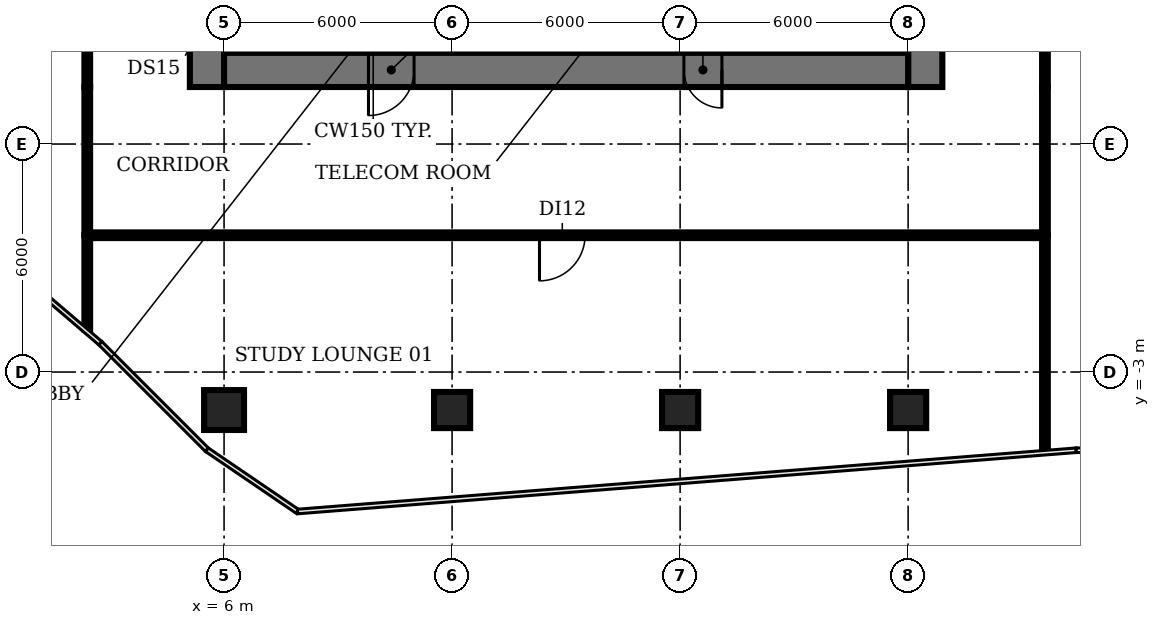
"""IFC4 building model, lengths in metres.
Left out: names, types, materials, properties, quantities, classifications, styles, units other than length and angle.
Written with IfcOpenShell. Run it as: python <this file> out.ifc"""

import sys

from ifc_helpers import new_model, si_unit, direction, frame, frame_2d, origin, origin_2d, place, context, subcontext, project, spatial, rectangle, circle, extrude, element, fill, save


model = new_model("IFC4")
c1 = context("Model", 3, precision=1e-05, world=origin(), true_north=direction((0.0, 1.0)))
c2 = subcontext(c1, "Body", "Model", "MODEL_VIEW")
j1 = project(units=[si_unit("LENGTHUNIT", "METRE"), si_unit("PLANEANGLEUNIT", "RADIAN")], contexts=[c1])
p1 = place(None, origin())
s1 = spatial("IfcSite", under=j1, at=p1, CompositionType="ELEMENT")
p2 = place(p1, origin())
s2 = spatial("IfcBuilding", under=s1, at=p2, CompositionType="ELEMENT")
p3 = place(p2, frame((0.0, 0.0, 71.0)))
s3 = spatial("IfcBuildingStorey", under=s2, at=p3, CompositionType="ELEMENT", Elevation=71.0)
p4 = place(p3, frame((6.0, -4.0, 0.0), z_axis=(0.0, 0.0, 1.0), x_axis=(1.0, 0.0, 0.0)))
e1 = element("IfcColumn", 1, at=p4, inside=s3, PredefinedType="COLUMN", context=c2, shape_type="SweptSolid", body=[
    extrude(circle(Radius=0.525, at=origin_2d()), origin(), (0.0, 0.0, 1.0), 3.85),
])
for number, where, z_axis, x_axis in (
    (2, (12.0, -4.0, 0.0), (0.0, 0.0, 1.0), (1.0, 0.0, 0.0)),
    (3, (18.0, -4.0, 0.0), (0.0, 0.0, 1.0), (1.0, 0.0, 0.0)),
    (4, (24.0, -4.0, 0.0), (0.0, 0.0, 1.0), (1.0, 0.0, 0.0)),
):
    element("IfcColumn", number, at=place(p3, frame(where, z_axis=z_axis, x_axis=x_axis)), inside=s3, PredefinedType="COLUMN", context=c2, shape_type="SweptSolid", body=[
        extrude(rectangle(XDim=0.95, YDim=0.95, at=origin_2d()), origin(), (0.0, 0.0, 1.0), 3.85),
    ])
p5 = place(p3, frame((9.275, 11.825, 0.0), z_axis=(0.0, 0.0, 1.0), x_axis=(0.0, -1.0, 0.0)))
e5 = element("IfcWall", 5, at=p5, inside=s3, PredefinedType="SHEAR", context=c2, shape_type="SweptSolid", body=[
    extrude(rectangle(XDim=6.425, YDim=0.25, at=frame_2d((3.212, 0.0))), origin(), (0.0, 0.0, 1.0), 3.85),
])
p6 = place(p5, frame((5.075, 0.0, 0.0)))
e6 = element("IfcOpeningElement", 6, at=p6, cuts=e5, PredefinedType="OPENING", context=c2, shape_type="SweptSolid", body=[
    extrude(rectangle(XDim=1.0, YDim=2.1, at=frame_2d((0.5, 1.05))), frame((0.0, 0.135, 0.0), z_axis=(0.0, -1.0, 0.0), x_axis=(1.0, 0.0, 0.0)), (0.0, 0.0, 1.0), 0.27),
])
p7 = place(p3, frame((13.5, 5.4, 0.0), z_axis=(0.0, 0.0, 1.0), x_axis=(0.0, 1.0, 0.0)))
e7 = element("IfcWall", 7, at=p7, inside=s3, PredefinedType="SHEAR", context=c2, shape_type="SweptSolid", body=[
    extrude(rectangle(XDim=8.2, YDim=0.2, at=frame_2d((4.1, 0.0))), origin(), (0.0, 0.0, 1.0), 3.85),
])
p8 = place(p7, frame((0.75, 0.0, 0.0)))
e8 = element("IfcOpeningElement", 8, at=p8, cuts=e7, PredefinedType="OPENING", context=c2, shape_type="SweptSolid", body=[
    extrude(rectangle(XDim=1.1, YDim=2.1, at=frame_2d((0.55, 1.05))), frame((0.0, 0.11, 0.0), z_axis=(0.0, -1.0, 0.0), x_axis=(1.0, 0.0, 0.0)), (0.0, 0.0, 1.0), 0.22),
])
p9 = place(p7, frame((3.55, 0.0, 0.0)))
e9 = element("IfcOpeningElement", 9, at=p9, cuts=e7, PredefinedType="OPENING", context=c2, shape_type="SweptSolid", body=[
    extrude(rectangle(XDim=1.1, YDim=2.1, at=frame_2d((0.55, 1.05))), frame((0.0, 0.11, 0.0), z_axis=(0.0, -1.0, 0.0), x_axis=(1.0, 0.0, 0.0)), (0.0, 0.0, 1.0), 0.22),
])
p10 = place(p7, frame((6.35, 0.0, 0.0)))
e10 = element("IfcOpeningElement", 10, at=p10, cuts=e7, PredefinedType="OPENING", context=c2, shape_type="SweptSolid", body=[
    extrude(rectangle(XDim=1.1, YDim=2.1, at=frame_2d((0.55, 1.05))), frame((0.0, 0.11, 0.0), z_axis=(0.0, -1.0, 0.0), x_axis=(1.0, 0.0, 0.0)), (0.0, 0.0, 1.0), 0.22),
])
p11 = place(p3, frame((16.5, 5.4, 0.0), z_axis=(0.0, 0.0, 1.0), x_axis=(0.0, 1.0, 0.0)))
e11 = element("IfcWall", 11, at=p11, inside=s3, PredefinedType="SHEAR", context=c2, shape_type="SweptSolid", body=[
    extrude(rectangle(XDim=8.2, YDim=0.2, at=frame_2d((4.1, 0.0))), origin(), (0.0, 0.0, 1.0), 3.85),
])
p12 = place(p3, frame((20.725, 5.4, 0.0), z_axis=(0.0, 0.0, 1.0), x_axis=(0.0, 1.0, 0.0)))
e12 = element("IfcWall", 12, at=p12, inside=s3, PredefinedType="SHEAR", context=c2, shape_type="SweptSolid", body=[
    extrude(rectangle(XDim=6.3, YDim=0.25, at=frame_2d((3.15, 0.0))), origin(), (0.0, 0.0, 1.0), 3.85),
])
p13 = place(p3, frame((5.55, 4.5, 0.0), z_axis=(0.0, 0.0, 1.0), x_axis=(0.0, 1.0, 0.0)))
e13 = element("IfcWall", 13, at=p13, inside=s3, PredefinedType="SHEAR", context=c2, shape_type="SweptSolid", body=[
    extrude(rectangle(XDim=21.2, YDim=0.9, at=frame_2d((10.6, 0.0))), origin(), (0.0, 0.0, 1.0), 3.85),
])
p14 = place(p13, frame((1.15, 0.0, 0.0)))
e14 = element("IfcOpeningElement", 14, at=p14, cuts=e13, PredefinedType="OPENING", context=c2, shape_type="SweptSolid", body=[
    extrude(rectangle(XDim=1.5, YDim=2.1, at=frame_2d((0.75, 1.05))), frame((0.0, 0.46, 0.0), z_axis=(0.0, -1.0, 0.0), x_axis=(1.0, 0.0, 0.0)), (0.0, 0.0, 1.0), 0.92),
])
p15 = place(p13, frame((7.6, 0.0, 0.0)))
e15 = element("IfcOpeningElement", 15, at=p15, cuts=e13, PredefinedType="OPENING", context=c2, shape_type="SweptSolid", body=[
    extrude(rectangle(XDim=1.2, YDim=2.1, at=frame_2d((0.6, 1.05))), frame((0.0, 0.46, 0.0), z_axis=(0.0, -1.0, 0.0), x_axis=(1.0, 0.0, 0.0)), (0.0, 0.0, 1.0), 0.92),
])
p16 = place(p13, frame((14.15, 0.0, 0.0)))
e16 = element("IfcOpeningElement", 16, at=p16, cuts=e13, PredefinedType="OPENING", context=c2, shape_type="SweptSolid", body=[
    extrude(rectangle(XDim=1.2, YDim=2.1, at=frame_2d((0.6, 1.05))), frame((0.0, 0.46, 0.0), z_axis=(0.0, -1.0, 0.0), x_axis=(1.0, 0.0, 0.0)), (0.0, 0.0, 1.0), 0.92),
])
p17 = place(p3, frame((24.45, 25.7, 0.0), z_axis=(0.0, 0.0, 1.0), x_axis=(0.0, -1.0, 0.0)))
e17 = element("IfcWall", 17, at=p17, inside=s3, PredefinedType="SHEAR", context=c2, shape_type="SweptSolid", body=[
    extrude(rectangle(XDim=21.2, YDim=0.9, at=frame_2d((10.6, 0.0))), origin(), (0.0, 0.0, 1.0), 3.85),
])
p18 = place(p17, frame((18.55, 0.0, 0.0)))
e18 = element("IfcOpeningElement", 18, at=p18, cuts=e17, PredefinedType="OPENING", context=c2, shape_type="SweptSolid", body=[
    extrude(rectangle(XDim=1.5, YDim=2.1, at=frame_2d((0.75, 1.05))), frame((0.0, 0.46, 0.0), z_axis=(0.0, -1.0, 0.0), x_axis=(1.0, 0.0, 0.0)), (0.0, 0.0, 1.0), 0.92),
])
p19 = place(p17, frame((12.45, 0.0, 0.0)))
e19 = element("IfcOpeningElement", 19, at=p19, cuts=e17, PredefinedType="OPENING", context=c2, shape_type="SweptSolid", body=[
    extrude(rectangle(XDim=0.9, YDim=2.1, at=frame_2d((0.45, 1.05))), frame((0.0, 0.46, 0.0), z_axis=(0.0, -1.0, 0.0), x_axis=(1.0, 0.0, 0.0)), (0.0, 0.0, 1.0), 0.92),
])
p20 = place(p17, frame((6.45, 0.0, 0.0)))
e20 = element("IfcOpeningElement", 20, at=p20, cuts=e17, PredefinedType="OPENING", context=c2, shape_type="SweptSolid", body=[
    extrude(rectangle(XDim=2.0, YDim=2.1, at=frame_2d((1.0, 1.05))), frame((0.0, 0.46, 0.0), z_axis=(0.0, -1.0, 0.0), x_axis=(1.0, 0.0, 0.0)), (0.0, 0.0, 1.0), 0.92),
])
p21 = place(p3, frame((24.0, 4.95, 0.0), z_axis=(0.0, 0.0, 1.0), x_axis=(-1.0, 0.0, 0.0)))
e21 = element("IfcWall", 21, at=p21, inside=s3, PredefinedType="SHEAR", context=c2, shape_type="SweptSolid", body=[
    extrude(rectangle(XDim=18.0, YDim=0.9, at=frame_2d((9.0, 0.0))), origin(), (0.0, 0.0, 1.0), 3.85),
])
p22 = place(p21, frame((13.0, 0.0, 0.0)))
e22 = element("IfcOpeningElement", 22, at=p22, cuts=e21, PredefinedType="OPENING", context=c2, shape_type="SweptSolid", body=[
    extrude(rectangle(XDim=1.2, YDim=2.1, at=frame_2d((0.6, 1.05))), frame((0.0, 0.46, 0.0), z_axis=(0.0, -1.0, 0.0), x_axis=(1.0, 0.0, 0.0)), (0.0, 0.0, 1.0), 0.92),
])
p23 = place(p21, frame((4.9, 0.0, 0.0)))
e23 = element("IfcOpeningElement", 23, at=p23, cuts=e21, PredefinedType="OPENING", context=c2, shape_type="SweptSolid", body=[
    extrude(rectangle(XDim=1.0, YDim=2.1, at=frame_2d((0.5, 1.05))), frame((0.0, 0.46, 0.0), z_axis=(0.0, -1.0, 0.0), x_axis=(1.0, 0.0, 0.0)), (0.0, 0.0, 1.0), 0.92),
])
p24 = place(p3, frame((2.4, -1.88, 0.0), z_axis=(0.0, 0.0, 1.0), x_axis=(0.0, 1.0, 0.0)))
e24 = element("IfcWall", 24, at=p24, inside=s3, PredefinedType="PARTITIONING", context=c2, shape_type="SweptSolid", body=[
    extrude(rectangle(XDim=2.48, YDim=0.15, at=frame_2d((1.24, 0.0))), origin(), (0.0, 0.0, 1.0), 2.83),
])
p25 = place(p3, frame((2.4, 0.6, 0.0), z_axis=(0.0, 0.0, 1.0), x_axis=(0.0, 1.0, 0.0)))
e25 = element("IfcWall", 25, at=p25, inside=s3, PredefinedType="PARTITIONING", context=c2, shape_type="SweptSolid", body=[
    extrude(rectangle(XDim=3.9, YDim=0.15, at=frame_2d((1.95, 0.0))), origin(), (0.0, 0.0, 1.0), 2.83),
])
p26 = place(p3, frame((2.4, 4.5, 0.0), z_axis=(0.0, 0.0, 1.0), x_axis=(0.0, 1.0, 0.0)))
e26 = element("IfcWall", 26, at=p26, inside=s3, PredefinedType="PARTITIONING", context=c2, shape_type="SweptSolid", body=[
    extrude(rectangle(XDim=21.2, YDim=0.15, at=frame_2d((10.6, 0.0))), origin(), (0.0, 0.0, 1.0), 2.83),
])
p27 = place(p26, frame((10.8, 0.0, 0.0)))
e27 = element("IfcOpeningElement", 27, at=p27, cuts=e26, PredefinedType="OPENING", context=c2, shape_type="SweptSolid", body=[
    extrude(rectangle(XDim=1.2, YDim=2.1, at=frame_2d((0.6, 1.05))), frame((0.0, 0.085, 0.0), z_axis=(0.0, -1.0, 0.0), x_axis=(1.0, 0.0, 0.0)), (0.0, 0.0, 1.0), 0.17),
])
p28 = place(p3, frame((27.6, -5.07, 0.0), z_axis=(0.0, 0.0, 1.0), x_axis=(0.0, 1.0, 0.0)))
e28 = element("IfcWall", 28, at=p28, inside=s3, PredefinedType="PARTITIONING", context=c2, shape_type="SweptSolid", body=[
    extrude(rectangle(XDim=5.67, YDim=0.15, at=frame_2d((2.835, 0.0))), origin(), (0.0, 0.0, 1.0), 2.83),
])
p29 = place(p3, frame((27.6, 0.6, 0.0), z_axis=(0.0, 0.0, 1.0), x_axis=(-1.0, 0.0, 0.0)))
e29 = element("IfcWall", 29, at=p29, inside=s3, PredefinedType="PARTITIONING", context=c2, shape_type="SweptSolid", body=[
    extrude(rectangle(XDim=25.2, YDim=0.15, at=frame_2d((12.6, 0.0))), origin(), (0.0, 0.0, 1.0), 2.83),
])
p30 = place(p29, frame((12.1, 0.0, 0.0)))
e30 = element("IfcOpeningElement", 30, at=p30, cuts=e29, PredefinedType="OPENING", context=c2, shape_type="SweptSolid", body=[
    extrude(rectangle(XDim=1.2, YDim=2.1, at=frame_2d((0.6, 1.05))), frame((0.0, 0.085, 0.0), z_axis=(0.0, -1.0, 0.0), x_axis=(1.0, 0.0, 0.0)), (0.0, 0.0, 1.0), 0.17),
])
p31 = place(p3, frame((27.6, 0.6, 0.0), z_axis=(0.0, 0.0, 1.0), x_axis=(0.0, 1.0, 0.0)))
e31 = element("IfcWall", 31, at=p31, inside=s3, PredefinedType="PARTITIONING", context=c2, shape_type="SweptSolid", body=[
    extrude(rectangle(XDim=3.9, YDim=0.15, at=frame_2d((1.95, 0.0))), origin(), (0.0, 0.0, 1.0), 2.83),
])
p32 = place(p3, frame((27.6, 15.0, 0.0), z_axis=(0.0, 0.0, 1.0), x_axis=(0.0, -1.0, 0.0)))
e32 = element("IfcWall", 32, at=p32, inside=s3, PredefinedType="PARTITIONING", context=c2, shape_type="SweptSolid", body=[
    extrude(rectangle(XDim=10.5, YDim=0.15, at=frame_2d((5.25, 0.0))), origin(), (0.0, 0.0, 1.0), 2.83),
])
p33 = place(p32, frame((4.8, 0.0, 0.0)))
e33 = element("IfcOpeningElement", 33, at=p33, cuts=e32, PredefinedType="OPENING", context=c2, shape_type="SweptSolid", body=[
    extrude(rectangle(XDim=1.0, YDim=2.1, at=frame_2d((0.5, 1.05))), frame((0.0, 0.085, 0.0), z_axis=(0.0, -1.0, 0.0), x_axis=(1.0, 0.0, 0.0)), (0.0, 0.0, 1.0), 0.17),
])
p34 = place(p22, origin())
e34 = element("IfcDoor", 34, at=p34, inside=s3, OperationType="SINGLE_SWING_RIGHT", PredefinedType="DOOR", context=c2, shape_type="SweptSolid", body=[
    extrude(rectangle(XDim=1.2, YDim=2.1, at=frame_2d((0.6, 1.05))), frame((0.0, 0.025, 0.0), z_axis=(0.0, -1.0, 0.0), x_axis=(1.0, 0.0, 0.0)), (0.0, 0.0, 1.0), 0.05),
])
fill(e22, e34)
p35 = place(p23, origin())
e35 = element("IfcDoor", 35, at=p35, inside=s3, OperationType="SINGLE_SWING_LEFT", PredefinedType="DOOR", context=c2, shape_type="SweptSolid", body=[
    extrude(rectangle(XDim=1.0, YDim=2.1, at=frame_2d((0.5, 1.05))), frame((0.0, -0.39, 0.0), z_axis=(0.0, -1.0, 0.0), x_axis=(1.0, 0.0, 0.0)), (0.0, 0.0, 1.0), 0.05),
])
fill(e23, e35)
p36 = place(p30, origin())
e36 = element("IfcDoor", 36, at=p36, inside=s3, OperationType="SINGLE_SWING_RIGHT", PredefinedType="DOOR", context=c2, shape_type="SweptSolid", body=[
    extrude(rectangle(XDim=1.2, YDim=2.1, at=frame_2d((0.6, 1.05))), frame((0.0, 0.025, 0.0), z_axis=(0.0, -1.0, 0.0), x_axis=(1.0, 0.0, 0.0)), (0.0, 0.0, 1.0), 0.05),
])
fill(e30, e36)
save(model, sys.argv[1])
